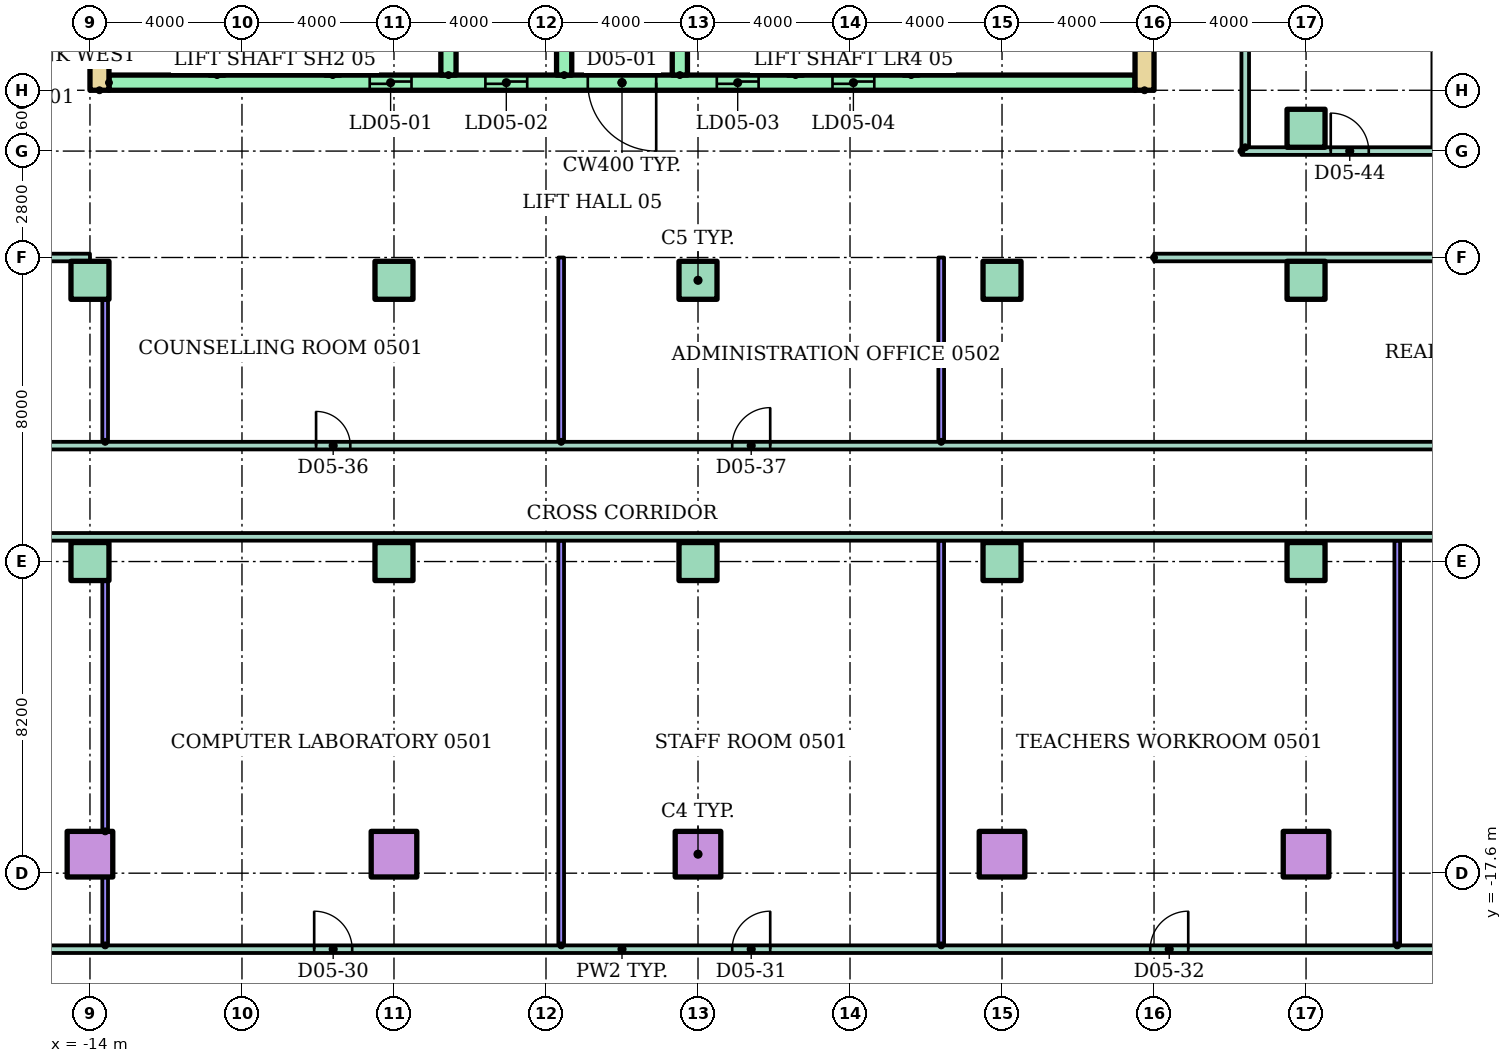
"""IFC4 building model, lengths in metres.
Left out: names, types, materials, properties, quantities, classifications, styles, units other than length and angle.
Written with IfcOpenShell. Run it as: python <this file> out.ifc"""

import sys

from ifc_helpers import new_model, si_unit, direction, frame, frame_2d, origin, origin_2d, place, context, subcontext, project, spatial, rectangle, hollow_rectangle, extrude, element, fill, save


model = new_model("IFC4")
c1 = context("Model", 3, precision=1e-05, world=origin(), true_north=direction((0.0, 1.0)))
c2 = subcontext(c1, "Body", "Model", "MODEL_VIEW")
j1 = project(units=[si_unit("LENGTHUNIT", "METRE"), si_unit("PLANEANGLEUNIT", "RADIAN")], contexts=[c1])
p1 = place(None, origin())
s1 = spatial("IfcSite", under=j1, at=p1, CompositionType="ELEMENT")
p2 = place(p1, origin())
s2 = spatial("IfcBuilding", under=s1, at=p2, CompositionType="ELEMENT")
p3 = place(p2, frame((0.0, 0.0, 22.0)))
s3 = spatial("IfcBuildingStorey", under=s2, at=p3, CompositionType="ELEMENT", Elevation=22.0)
for number, where in (
    (1, (-14.0, -17.1, 0.0)),
    (2, (-6.0, -17.1, 0.0)),
    (3, (2.0, -17.1, 0.0)),
    (4, (10.0, -17.1, 0.0)),
    (5, (18.0, -17.1, 0.0)),
):
    element("IfcColumn", number, at=place(p3, frame(where)), inside=s3, PredefinedType="COLUMN", context=c2, shape_type="SweptSolid", body=[
        extrude(hollow_rectangle(XDim=1.2, YDim=1.2, WallThickness=0.06, at=origin_2d()), origin(), (0.0, 0.0, 1.0), 4.0),
    ])
for number, where in (
    (6, (-14.0, -9.4, 0.0)),
    (7, (-6.0, -9.4, 0.0)),
    (8, (2.0, -9.4, 0.0)),
    (9, (10.0, -9.4, 0.0)),
    (10, (18.0, -9.4, 0.0)),
    (11, (-14.0, -2.0, 0.0)),
    (12, (-6.0, -2.0, 0.0)),
    (13, (2.0, -2.0, 0.0)),
    (14, (10.0, -2.0, 0.0)),
    (15, (18.0, -2.0, 0.0)),
    (16, (18.0, 2.0, 0.0)),
):
    element("IfcColumn", number, at=place(p3, frame(where)), inside=s3, PredefinedType="COLUMN", context=c2, shape_type="SweptSolid", body=[
        extrude(rectangle(XDim=1.0, YDim=1.0, at=origin_2d()), origin(), (0.0, 0.0, 1.0), 4.0),
    ])
for number, where, z_axis, x_axis in (
    (17, (-13.75, 3.0, 0.0), (0.0, 0.0, 1.0), (0.0, 1.0, 0.0)),
    (18, (13.75, 3.0, 0.0), (0.0, 0.0, 1.0), (0.0, 1.0, 0.0)),
):
    element("IfcWall", number, at=place(p3, frame(where, z_axis=z_axis, x_axis=x_axis)), inside=s3, PredefinedType="SHEAR", context=c2, shape_type="SweptSolid", body=[
        extrude(rectangle(XDim=17.0, YDim=0.5, at=frame_2d((8.5, 0.0))), origin(), (0.0, 0.0, 1.0), 3.2),
    ])
p4 = place(p3, frame((-13.5, 3.2, 0.0)))
e19 = element("IfcWall", 19, at=p4, inside=s3, PredefinedType="SHEAR", context=c2, shape_type="SweptSolid", body=[
    extrude(rectangle(XDim=27.0, YDim=0.4, at=frame_2d((13.5, 0.0))), origin(), (0.0, 0.0, 1.0), 3.2),
])
p5 = place(p4, frame((6.861, 0.0, 0.0)))
e20 = element("IfcOpeningElement", 20, at=p5, cuts=e19, PredefinedType="OPENING", context=c2, shape_type="SweptSolid", body=[
    extrude(rectangle(XDim=1.1, YDim=2.1, at=frame_2d((0.55, 1.05))), frame((0.0, 0.21, 0.0), z_axis=(0.0, -1.0, 0.0), x_axis=(1.0, 0.0, 0.0)), (0.0, 0.0, 1.0), 0.42),
])
p6 = place(p4, frame((9.906, 0.0, 0.0)))
e21 = element("IfcOpeningElement", 21, at=p6, cuts=e19, PredefinedType="OPENING", context=c2, shape_type="SweptSolid", body=[
    extrude(rectangle(XDim=1.1, YDim=2.1, at=frame_2d((0.55, 1.05))), frame((0.0, 0.21, 0.0), z_axis=(0.0, -1.0, 0.0), x_axis=(1.0, 0.0, 0.0)), (0.0, 0.0, 1.0), 0.42),
])
p7 = place(p4, frame((15.994, 0.0, 0.0)))
e22 = element("IfcOpeningElement", 22, at=p7, cuts=e19, PredefinedType="OPENING", context=c2, shape_type="SweptSolid", body=[
    extrude(rectangle(XDim=1.1, YDim=2.1, at=frame_2d((0.55, 1.05))), frame((0.0, 0.21, 0.0), z_axis=(0.0, -1.0, 0.0), x_axis=(1.0, 0.0, 0.0)), (0.0, 0.0, 1.0), 0.42),
])
p8 = place(p4, frame((19.039, 0.0, 0.0)))
e23 = element("IfcOpeningElement", 23, at=p8, cuts=e19, PredefinedType="OPENING", context=c2, shape_type="SweptSolid", body=[
    extrude(rectangle(XDim=1.1, YDim=2.1, at=frame_2d((0.55, 1.05))), frame((0.0, 0.21, 0.0), z_axis=(0.0, -1.0, 0.0), x_axis=(1.0, 0.0, 0.0)), (0.0, 0.0, 1.0), 0.42),
])
p9 = place(p4, frame((12.6, 0.0, 0.0)))
e24 = element("IfcOpeningElement", 24, at=p9, cuts=e19, PredefinedType="OPENING", context=c2, shape_type="SweptSolid", body=[
    extrude(rectangle(XDim=1.8, YDim=2.1, at=frame_2d((0.9, 1.05))), frame((0.0, 0.21, 0.0), z_axis=(0.0, -1.0, 0.0), x_axis=(1.0, 0.0, 0.0)), (0.0, 0.0, 1.0), 0.42),
])
for number, where, z_axis, x_axis in (
    (25, (-10.656, 3.4, 0.0), (0.0, 0.0, 1.0), (0.0, 1.0, 0.0)),
    (26, (-7.611, 3.4, 0.0), (0.0, 0.0, 1.0), (0.0, 1.0, 0.0)),
    (27, (-4.567, 3.4, 0.0), (0.0, 0.0, 1.0), (0.0, 1.0, 0.0)),
    (28, (-1.522, 3.4, 0.0), (0.0, 0.0, 1.0), (0.0, 1.0, 0.0)),
    (29, (1.522, 3.4, 0.0), (0.0, 0.0, 1.0), (0.0, 1.0, 0.0)),
    (30, (4.567, 3.4, 0.0), (0.0, 0.0, 1.0), (0.0, 1.0, 0.0)),
    (31, (7.611, 3.4, 0.0), (0.0, 0.0, 1.0), (0.0, 1.0, 0.0)),
):
    element("IfcWall", number, at=place(p3, frame(where, z_axis=z_axis, x_axis=x_axis)), inside=s3, PredefinedType="SHEAR", context=c2, shape_type="SweptSolid", body=[
        extrude(rectangle(XDim=3.0, YDim=0.4, at=frame_2d((1.5, 0.0))), origin(), (0.0, 0.0, 1.0), 3.2),
    ])
p10 = place(p3, frame((-37.6, -19.6, 0.0)))
e32 = element("IfcWall", 32, at=p10, inside=s3, PredefinedType="PARTITIONING", context=c2, shape_type="SweptSolid", body=[
    extrude(rectangle(XDim=75.2, YDim=0.2, at=frame_2d((37.6, 0.0))), origin(), (0.0, 0.0, 1.0), 3.2),
])
p11 = place(p10, frame((5.5, 0.0, 0.0)))
e33 = element("IfcOpeningElement", 33, at=p11, cuts=e32, PredefinedType="OPENING", context=c2, shape_type="SweptSolid", body=[
    extrude(rectangle(XDim=1.0, YDim=2.1, at=frame_2d((0.5, 1.05))), frame((0.0, 0.11, 0.0), z_axis=(0.0, -1.0, 0.0), x_axis=(1.0, 0.0, 0.0)), (0.0, 0.0, 1.0), 0.22),
])
p12 = place(p10, frame((17.5, 0.0, 0.0)))
e34 = element("IfcOpeningElement", 34, at=p12, cuts=e32, PredefinedType="OPENING", context=c2, shape_type="SweptSolid", body=[
    extrude(rectangle(XDim=1.0, YDim=2.1, at=frame_2d((0.5, 1.05))), frame((0.0, 0.11, 0.0), z_axis=(0.0, -1.0, 0.0), x_axis=(1.0, 0.0, 0.0)), (0.0, 0.0, 1.0), 0.22),
])
p13 = place(p10, frame((29.5, 0.0, 0.0)))
e35 = element("IfcOpeningElement", 35, at=p13, cuts=e32, PredefinedType="OPENING", context=c2, shape_type="SweptSolid", body=[
    extrude(rectangle(XDim=1.0, YDim=2.1, at=frame_2d((0.5, 1.05))), frame((0.0, 0.11, 0.0), z_axis=(0.0, -1.0, 0.0), x_axis=(1.0, 0.0, 0.0)), (0.0, 0.0, 1.0), 0.22),
])
p14 = place(p10, frame((40.5, 0.0, 0.0)))
e36 = element("IfcOpeningElement", 36, at=p14, cuts=e32, PredefinedType="OPENING", context=c2, shape_type="SweptSolid", body=[
    extrude(rectangle(XDim=1.0, YDim=2.1, at=frame_2d((0.5, 1.05))), frame((0.0, 0.11, 0.0), z_axis=(0.0, -1.0, 0.0), x_axis=(1.0, 0.0, 0.0)), (0.0, 0.0, 1.0), 0.22),
])
p15 = place(p10, frame((51.5, 0.0, 0.0)))
e37 = element("IfcOpeningElement", 37, at=p15, cuts=e32, PredefinedType="OPENING", context=c2, shape_type="SweptSolid", body=[
    extrude(rectangle(XDim=1.0, YDim=2.1, at=frame_2d((0.5, 1.05))), frame((0.0, 0.11, 0.0), z_axis=(0.0, -1.0, 0.0), x_axis=(1.0, 0.0, 0.0)), (0.0, 0.0, 1.0), 0.22),
])
p16 = place(p10, frame((66.1, 0.0, 0.0)))
e38 = element("IfcOpeningElement", 38, at=p16, cuts=e32, PredefinedType="OPENING", context=c2, shape_type="SweptSolid", body=[
    extrude(rectangle(XDim=1.0, YDim=2.1, at=frame_2d((0.5, 1.05))), frame((0.0, 0.11, 0.0), z_axis=(0.0, -1.0, 0.0), x_axis=(1.0, 0.0, 0.0)), (0.0, 0.0, 1.0), 0.22),
])
p17 = place(p3, frame((-36.9, -8.75, 0.0)))
e39 = element("IfcWall", 39, at=p17, inside=s3, PredefinedType="PARTITIONING", context=c2, shape_type="SweptSolid", body=[
    extrude(rectangle(XDim=73.8, YDim=0.2, at=frame_2d((36.9, 0.0))), origin(), (0.0, 0.0, 1.0), 3.2),
])
p18 = place(p3, frame((-37.6, -6.35, 0.0)))
e40 = element("IfcWall", 40, at=p18, inside=s3, PredefinedType="PARTITIONING", context=c2, shape_type="SweptSolid", body=[
    extrude(rectangle(XDim=75.2, YDim=0.2, at=frame_2d((37.6, 0.0))), origin(), (0.0, 0.0, 1.0), 3.2),
])
p19 = place(p18, frame((5.5, 0.0, 0.0)))
e41 = element("IfcOpeningElement", 41, at=p19, cuts=e40, PredefinedType="OPENING", context=c2, shape_type="SweptSolid", body=[
    extrude(rectangle(XDim=1.0, YDim=2.1, at=frame_2d((0.5, 1.05))), frame((0.0, 0.11, 0.0), z_axis=(0.0, -1.0, 0.0), x_axis=(1.0, 0.0, 0.0)), (0.0, 0.0, 1.0), 0.22),
])
p20 = place(p18, frame((17.55, 0.0, 0.0)))
e42 = element("IfcOpeningElement", 42, at=p20, cuts=e40, PredefinedType="OPENING", context=c2, shape_type="SweptSolid", body=[
    extrude(rectangle(XDim=0.9, YDim=2.1, at=frame_2d((0.45, 1.05))), frame((0.0, 0.11, 0.0), z_axis=(0.0, -1.0, 0.0), x_axis=(1.0, 0.0, 0.0)), (0.0, 0.0, 1.0), 0.22),
])
p21 = place(p18, frame((29.55, 0.0, 0.0)))
e43 = element("IfcOpeningElement", 43, at=p21, cuts=e40, PredefinedType="OPENING", context=c2, shape_type="SweptSolid", body=[
    extrude(rectangle(XDim=0.9, YDim=2.1, at=frame_2d((0.45, 1.05))), frame((0.0, 0.11, 0.0), z_axis=(0.0, -1.0, 0.0), x_axis=(1.0, 0.0, 0.0)), (0.0, 0.0, 1.0), 0.22),
])
p22 = place(p18, frame((40.5, 0.0, 0.0)))
e44 = element("IfcOpeningElement", 44, at=p22, cuts=e40, PredefinedType="OPENING", context=c2, shape_type="SweptSolid", body=[
    extrude(rectangle(XDim=1.0, YDim=2.1, at=frame_2d((0.5, 1.05))), frame((0.0, 0.11, 0.0), z_axis=(0.0, -1.0, 0.0), x_axis=(1.0, 0.0, 0.0)), (0.0, 0.0, 1.0), 0.22),
])
p23 = place(p18, frame((60.1, 0.0, 0.0)))
e45 = element("IfcOpeningElement", 45, at=p23, cuts=e40, PredefinedType="OPENING", context=c2, shape_type="SweptSolid", body=[
    extrude(rectangle(XDim=1.0, YDim=2.1, at=frame_2d((0.5, 1.05))), frame((0.0, 0.11, 0.0), z_axis=(0.0, -1.0, 0.0), x_axis=(1.0, 0.0, 0.0)), (0.0, 0.0, 1.0), 0.22),
])
for number, where in (
    (46, (-36.9, -1.4, 0.0)),
    (47, (14.0, -1.4, 0.0)),
):
    element("IfcWall", number, at=place(p3, frame(where)), inside=s3, PredefinedType="PARTITIONING", context=c2, shape_type="SweptSolid", body=[
        extrude(rectangle(XDim=22.9, YDim=0.2, at=frame_2d((11.45, 0.0))), origin(), (0.0, 0.0, 1.0), 3.2),
    ])
p24 = place(p3, frame((16.3, 1.4, 0.0)))
e48 = element("IfcWall", 48, at=p24, inside=s3, PredefinedType="PARTITIONING", context=c2, shape_type="SweptSolid", body=[
    extrude(rectangle(XDim=20.6, YDim=0.2, at=frame_2d((10.3, 0.0))), origin(), (0.0, 0.0, 1.0), 3.2),
])
p25 = place(p24, frame((2.35, 0.0, 0.0)))
e49 = element("IfcOpeningElement", 49, at=p25, cuts=e48, PredefinedType="OPENING", context=c2, shape_type="SweptSolid", body=[
    extrude(rectangle(XDim=1.0, YDim=2.1, at=frame_2d((0.5, 1.05))), frame((0.0, 0.11, 0.0), z_axis=(0.0, -1.0, 0.0), x_axis=(1.0, 0.0, 0.0)), (0.0, 0.0, 1.0), 0.22),
])
p26 = place(p24, frame((7.1, 0.0, 0.0)))
e50 = element("IfcOpeningElement", 50, at=p26, cuts=e48, PredefinedType="OPENING", context=c2, shape_type="SweptSolid", body=[
    extrude(rectangle(XDim=1.0, YDim=2.1, at=frame_2d((0.5, 1.05))), frame((0.0, 0.11, 0.0), z_axis=(0.0, -1.0, 0.0), x_axis=(1.0, 0.0, 0.0)), (0.0, 0.0, 1.0), 0.22),
])
p27 = place(p24, frame((10.8, 0.0, 0.0)))
e51 = element("IfcOpeningElement", 51, at=p27, cuts=e48, PredefinedType="OPENING", context=c2, shape_type="SweptSolid", body=[
    extrude(rectangle(XDim=1.0, YDim=2.1, at=frame_2d((0.5, 1.05))), frame((0.0, 0.11, 0.0), z_axis=(0.0, -1.0, 0.0), x_axis=(1.0, 0.0, 0.0)), (0.0, 0.0, 1.0), 0.22),
])
p28 = place(p24, frame((13.15, 0.0, 0.0)))
e52 = element("IfcOpeningElement", 52, at=p28, cuts=e48, PredefinedType="OPENING", context=c2, shape_type="SweptSolid", body=[
    extrude(rectangle(XDim=0.9, YDim=2.1, at=frame_2d((0.45, 1.05))), frame((0.0, 0.11, 0.0), z_axis=(0.0, -1.0, 0.0), x_axis=(1.0, 0.0, 0.0)), (0.0, 0.0, 1.0), 0.22),
])
p29 = place(p3, frame((-13.6, -19.5, 0.0), z_axis=(0.0, 0.0, 1.0), x_axis=(0.0, 1.0, 0.0)))
e53 = element("IfcWall", 53, at=p29, inside=s3, PredefinedType="PARTITIONING", context=c2, shape_type="SweptSolid", body=[
    extrude(rectangle(XDim=1.8, YDim=0.15, at=frame_2d((0.9, 0.0))), origin(), (0.0, 0.0, 1.0), 3.2),
])
p30 = place(p3, frame((-13.6, -16.5, 0.0), z_axis=(0.0, 0.0, 1.0), x_axis=(0.0, 1.0, 0.0)))
e54 = element("IfcWall", 54, at=p30, inside=s3, PredefinedType="PARTITIONING", context=c2, shape_type="SweptSolid", body=[
    extrude(rectangle(XDim=6.6, YDim=0.15, at=frame_2d((3.3, 0.0))), origin(), (0.0, 0.0, 1.0), 3.2),
])
p31 = place(p3, frame((-13.6, -6.25, 0.0), z_axis=(0.0, 0.0, 1.0), x_axis=(0.0, 1.0, 0.0)))
e55 = element("IfcWall", 55, at=p31, inside=s3, PredefinedType="PARTITIONING", context=c2, shape_type="SweptSolid", body=[
    extrude(rectangle(XDim=3.75, YDim=0.15, at=frame_2d((1.875, 0.0))), origin(), (0.0, 0.0, 1.0), 3.2),
])
p32 = place(p3, frame((-1.6, -19.5, 0.0), z_axis=(0.0, 0.0, 1.0), x_axis=(0.0, 1.0, 0.0)))
e56 = element("IfcWall", 56, at=p32, inside=s3, PredefinedType="PARTITIONING", context=c2, shape_type="SweptSolid", body=[
    extrude(rectangle(XDim=10.65, YDim=0.15, at=frame_2d((5.325, 0.0))), origin(), (0.0, 0.0, 1.0), 3.2),
])
p33 = place(p3, frame((-1.6, -6.25, 0.0), z_axis=(0.0, 0.0, 1.0), x_axis=(0.0, 1.0, 0.0)))
e57 = element("IfcWall", 57, at=p33, inside=s3, PredefinedType="PARTITIONING", context=c2, shape_type="SweptSolid", body=[
    extrude(rectangle(XDim=4.85, YDim=0.15, at=frame_2d((2.425, 0.0))), origin(), (0.0, 0.0, 1.0), 3.2),
])
p34 = place(p3, frame((8.4, -19.5, 0.0), z_axis=(0.0, 0.0, 1.0), x_axis=(0.0, 1.0, 0.0)))
e58 = element("IfcWall", 58, at=p34, inside=s3, PredefinedType="PARTITIONING", context=c2, shape_type="SweptSolid", body=[
    extrude(rectangle(XDim=10.65, YDim=0.15, at=frame_2d((5.325, 0.0))), origin(), (0.0, 0.0, 1.0), 3.2),
])
p35 = place(p3, frame((8.4, -6.25, 0.0), z_axis=(0.0, 0.0, 1.0), x_axis=(0.0, 1.0, 0.0)))
e59 = element("IfcWall", 59, at=p35, inside=s3, PredefinedType="PARTITIONING", context=c2, shape_type="SweptSolid", body=[
    extrude(rectangle(XDim=4.85, YDim=0.15, at=frame_2d((2.425, 0.0))), origin(), (0.0, 0.0, 1.0), 3.2),
])
p36 = place(p3, frame((16.4, 1.5, 0.0), z_axis=(0.0, 0.0, 1.0), x_axis=(0.0, 1.0, 0.0)))
e60 = element("IfcWall", 60, at=p36, inside=s3, PredefinedType="PARTITIONING", context=c2, shape_type="SweptSolid", body=[
    extrude(rectangle(XDim=7.0, YDim=0.2, at=frame_2d((3.5, 0.0))), origin(), (0.0, 0.0, 1.0), 3.2),
])
p37 = place(p3, frame((20.4, -19.5, 0.0), z_axis=(0.0, 0.0, 1.0), x_axis=(0.0, 1.0, 0.0)))
e61 = element("IfcWall", 61, at=p37, inside=s3, PredefinedType="PARTITIONING", context=c2, shape_type="SweptSolid", body=[
    extrude(rectangle(XDim=10.65, YDim=0.15, at=frame_2d((5.325, 0.0))), origin(), (0.0, 0.0, 1.0), 3.2),
])
p38 = place(p5, origin())
e62 = element("IfcDoor", 62, at=p38, inside=s3, OperationType="SLIDING_TO_LEFT", PredefinedType="DOOR", context=c2, shape_type="SweptSolid", body=[
    extrude(rectangle(XDim=1.1, YDim=2.1, at=frame_2d((0.55, 1.05))), frame((0.0, 0.025, 0.0), z_axis=(0.0, -1.0, 0.0), x_axis=(1.0, 0.0, 0.0)), (0.0, 0.0, 1.0), 0.05),
])
fill(e20, e62)
p39 = place(p6, origin())
e63 = element("IfcDoor", 63, at=p39, inside=s3, OperationType="SLIDING_TO_LEFT", PredefinedType="DOOR", context=c2, shape_type="SweptSolid", body=[
    extrude(rectangle(XDim=1.1, YDim=2.1, at=frame_2d((0.55, 1.05))), frame((0.0, 0.025, 0.0), z_axis=(0.0, -1.0, 0.0), x_axis=(1.0, 0.0, 0.0)), (0.0, 0.0, 1.0), 0.05),
])
fill(e21, e63)
p40 = place(p7, origin())
e64 = element("IfcDoor", 64, at=p40, inside=s3, OperationType="SLIDING_TO_LEFT", PredefinedType="DOOR", context=c2, shape_type="SweptSolid", body=[
    extrude(rectangle(XDim=1.1, YDim=2.1, at=frame_2d((0.55, 1.05))), frame((0.0, 0.025, 0.0), z_axis=(0.0, -1.0, 0.0), x_axis=(1.0, 0.0, 0.0)), (0.0, 0.0, 1.0), 0.05),
])
fill(e22, e64)
p41 = place(p8, origin())
e65 = element("IfcDoor", 65, at=p41, inside=s3, OperationType="SLIDING_TO_LEFT", PredefinedType="DOOR", context=c2, shape_type="SweptSolid", body=[
    extrude(rectangle(XDim=1.1, YDim=2.1, at=frame_2d((0.55, 1.05))), frame((0.0, 0.025, 0.0), z_axis=(0.0, -1.0, 0.0), x_axis=(1.0, 0.0, 0.0)), (0.0, 0.0, 1.0), 0.05),
])
fill(e23, e65)
p42 = place(p9, frame((1.8, 0.0, 0.0), z_axis=(0.0, 0.0, 1.0), x_axis=(-1.0, 0.0, 0.0)))
e66 = element("IfcDoor", 66, at=p42, inside=s3, OperationType="DOUBLE_DOOR_SINGLE_SWING", PredefinedType="DOOR", context=c2, shape_type="SweptSolid", body=[
    extrude(rectangle(XDim=1.8, YDim=2.1, at=frame_2d((0.9, 1.05))), frame((0.0, 0.025, 0.0), z_axis=(0.0, -1.0, 0.0), x_axis=(1.0, 0.0, 0.0)), (0.0, 0.0, 1.0), 0.05),
])
fill(e24, e66)
p43 = place(p13, origin())
e67 = element("IfcDoor", 67, at=p43, inside=s3, OperationType="SINGLE_SWING_LEFT", PredefinedType="DOOR", context=c2, shape_type="SweptSolid", body=[
    extrude(rectangle(XDim=1.0, YDim=2.1, at=frame_2d((0.5, 1.05))), frame((0.0, 0.025, 0.0), z_axis=(0.0, -1.0, 0.0), x_axis=(1.0, 0.0, 0.0)), (0.0, 0.0, 1.0), 0.05),
])
fill(e35, e67)
p44 = place(p14, origin())
e68 = element("IfcDoor", 68, at=p44, inside=s3, OperationType="SINGLE_SWING_RIGHT", PredefinedType="DOOR", context=c2, shape_type="SweptSolid", body=[
    extrude(rectangle(XDim=1.0, YDim=2.1, at=frame_2d((0.5, 1.05))), frame((0.0, 0.025, 0.0), z_axis=(0.0, -1.0, 0.0), x_axis=(1.0, 0.0, 0.0)), (0.0, 0.0, 1.0), 0.05),
])
fill(e36, e68)
p45 = place(p15, origin())
e69 = element("IfcDoor", 69, at=p45, inside=s3, OperationType="SINGLE_SWING_RIGHT", PredefinedType="DOOR", context=c2, shape_type="SweptSolid", body=[
    extrude(rectangle(XDim=1.0, YDim=2.1, at=frame_2d((0.5, 1.05))), frame((0.0, 0.025, 0.0), z_axis=(0.0, -1.0, 0.0), x_axis=(1.0, 0.0, 0.0)), (0.0, 0.0, 1.0), 0.05),
])
fill(e37, e69)
p46 = place(p21, origin())
e70 = element("IfcDoor", 70, at=p46, inside=s3, OperationType="SINGLE_SWING_LEFT", PredefinedType="DOOR", context=c2, shape_type="SweptSolid", body=[
    extrude(rectangle(XDim=0.9, YDim=2.1, at=frame_2d((0.45, 1.05))), frame((0.0, 0.025, 0.0), z_axis=(0.0, -1.0, 0.0), x_axis=(1.0, 0.0, 0.0)), (0.0, 0.0, 1.0), 0.05),
])
fill(e43, e70)
p47 = place(p22, origin())
e71 = element("IfcDoor", 71, at=p47, inside=s3, OperationType="SINGLE_SWING_RIGHT", PredefinedType="DOOR", context=c2, shape_type="SweptSolid", body=[
    extrude(rectangle(XDim=1.0, YDim=2.1, at=frame_2d((0.5, 1.05))), frame((0.0, 0.025, 0.0), z_axis=(0.0, -1.0, 0.0), x_axis=(1.0, 0.0, 0.0)), (0.0, 0.0, 1.0), 0.05),
])
fill(e44, e71)
p48 = place(p25, origin())
e72 = element("IfcDoor", 72, at=p48, inside=s3, OperationType="SINGLE_SWING_LEFT", PredefinedType="DOOR", context=c2, shape_type="SweptSolid", body=[
    extrude(rectangle(XDim=1.0, YDim=2.1, at=frame_2d((0.5, 1.05))), frame((0.0, 0.025, 0.0), z_axis=(0.0, -1.0, 0.0), x_axis=(1.0, 0.0, 0.0)), (0.0, 0.0, 1.0), 0.05),
])
fill(e49, e72)
save(model, sys.argv[1])
